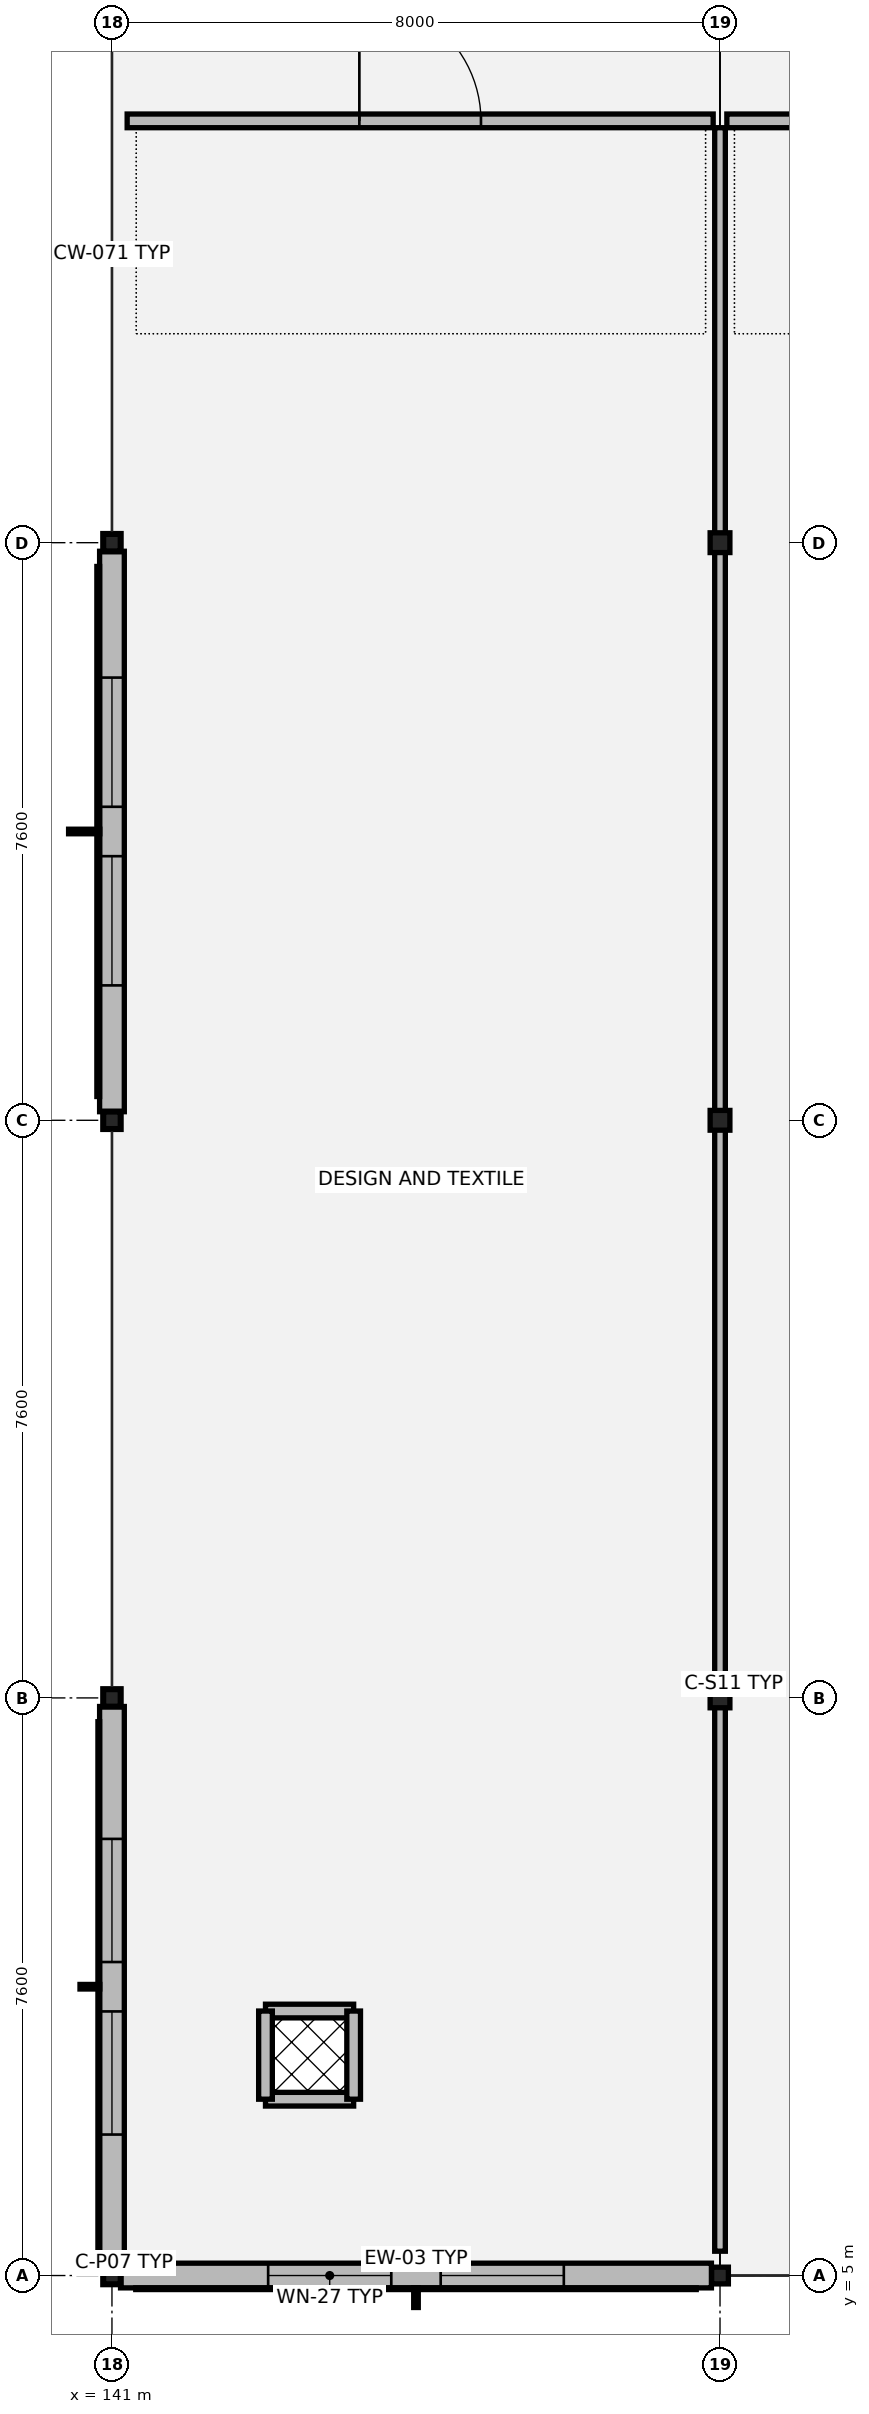
"""IFC4 building model, lengths in metres.
Left out: names, types, materials, properties, quantities, classifications, styles, units other than length and angle.
Written with IfcOpenShell. Run it as: python <this file> out.ifc"""

import sys

from ifc_helpers import new_model, si_unit, direction, frame, frame_2d, origin, origin_2d, place, context, subcontext, project, spatial, rectangle, hollow_rectangle, i_section, extrude, element, fill, save


model = new_model("IFC4")
c1 = context("Model", 3, precision=1e-05, world=origin(), true_north=direction((0.0, 1.0)))
c2 = subcontext(c1, "Body", "Model", "MODEL_VIEW")
j1 = project(units=[si_unit("LENGTHUNIT", "METRE"), si_unit("PLANEANGLEUNIT", "RADIAN")], contexts=[c1])
p1 = place(None, origin())
s1 = spatial("IfcSite", under=j1, at=p1, CompositionType="ELEMENT")
p2 = place(p1, origin())
s2 = spatial("IfcBuilding", under=s1, at=p2, CompositionType="ELEMENT")
p3 = place(p2, frame((0.0, 0.0, 13.26)))
s3 = spatial("IfcBuildingStorey", under=s2, at=p3, CompositionType="ELEMENT", Elevation=13.26)
for number, where, z_axis, x_axis in (
    (1, (141.0, 5.0, 0.0), (0.0, 0.0, 1.0), (1.0, 0.0, 0.0)),
    (2, (141.0, 12.6, 0.0), (0.0, 0.0, 1.0), (1.0, 0.0, 0.0)),
    (3, (141.0, 20.2, 0.0), (0.0, 0.0, 1.0), (1.0, 0.0, 0.0)),
    (4, (141.0, 27.8, 0.0), (0.0, 0.0, 1.0), (1.0, 0.0, 0.0)),
):
    element("IfcColumn", number, at=place(p3, frame(where, z_axis=z_axis, x_axis=x_axis)), inside=s3, PredefinedType="COLUMN", context=c2, shape_type="SweptSolid", body=[
        extrude(hollow_rectangle(XDim=0.22, YDim=0.22, WallThickness=0.01, at=origin_2d()), origin(), (0.0, 0.0, 1.0), 3.855),
    ])
p4 = place(p3, frame((149.0, 5.0, 0.0), z_axis=(0.0, 0.0, 1.0), x_axis=(1.0, 0.0, 0.0)))
e5 = element("IfcColumn", 5, at=p4, inside=s3, PredefinedType="COLUMN", context=c2, shape_type="SweptSolid", body=[
    extrude(hollow_rectangle(XDim=0.22, YDim=0.22, WallThickness=0.01, at=origin_2d()), origin(), (0.0, 0.0, 1.0), 4.055),
])
for number, where, z_axis, x_axis in (
    (6, (149.0, 12.6, 0.0), (0.0, 0.0, 1.0), (1.0, 0.0, 0.0)),
    (7, (149.0, 20.2, 0.0), (0.0, 0.0, 1.0), (1.0, 0.0, 0.0)),
    (8, (149.0, 27.8, 0.0), (0.0, 0.0, 1.0), (1.0, 0.0, 0.0)),
):
    element("IfcColumn", number, at=place(p3, frame(where, z_axis=z_axis, x_axis=x_axis)), inside=s3, PredefinedType="COLUMN", context=c2, shape_type="SweptSolid", body=[
        extrude(i_section(OverallWidth=0.26, OverallDepth=0.26, WebThickness=0.01, FlangeThickness=0.018, at=origin_2d()), origin(), (0.0, 0.0, 1.0), 4.055),
    ])
p5 = place(p3, frame((141.113, 5.0, 0.0), z_axis=(0.0, 0.0, 1.0), x_axis=(1.0, 0.0, 0.0)))
e9 = element("IfcWall", 9, at=p5, inside=s3, PredefinedType="SOLIDWALL", context=c2, shape_type="SweptSolid", body=[
    extrude(rectangle(XDim=7.774, YDim=0.325, at=frame_2d((3.887, 0.0))), origin(), (0.0, 0.0, 1.0), 3.48),
])
p6 = place(p5, frame((1.942, 0.0, 0.8)))
e10 = element("IfcOpeningElement", 10, at=p6, cuts=e9, PredefinedType="OPENING", context=c2, shape_type="SweptSolid", body=[
    extrude(rectangle(XDim=1.62, YDim=2.06, at=frame_2d((0.81, 1.03))), frame((0.0, 0.172, 0.0), z_axis=(0.0, -1.0, 0.0), x_axis=(1.0, 0.0, 0.0)), (0.0, 0.0, 1.0), 0.345),
])
p7 = place(p5, frame((4.212, 0.0, 0.8)))
e11 = element("IfcOpeningElement", 11, at=p7, cuts=e9, PredefinedType="OPENING", context=c2, shape_type="SweptSolid", body=[
    extrude(rectangle(XDim=1.62, YDim=2.06, at=frame_2d((0.81, 1.03))), frame((0.0, 0.172, 0.0), z_axis=(0.0, -1.0, 0.0), x_axis=(1.0, 0.0, 0.0)), (0.0, 0.0, 1.0), 0.345),
])
p8 = place(p3, frame((141.0, 27.687, 0.0), z_axis=(0.0, 0.0, 1.0), x_axis=(0.0, -1.0, 0.0)))
e12 = element("IfcWall", 12, at=p8, inside=s3, PredefinedType="SOLIDWALL", context=c2, shape_type="SweptSolid", body=[
    extrude(rectangle(XDim=7.374, YDim=0.325, at=frame_2d((3.687, 0.0))), origin(), (0.0, 0.0, 1.0), 3.48),
])
p9 = place(p8, frame((1.662, 0.0, 0.8)))
e13 = element("IfcOpeningElement", 13, at=p9, cuts=e12, PredefinedType="OPENING", context=c2, shape_type="SweptSolid", body=[
    extrude(rectangle(XDim=1.7, YDim=2.2, at=frame_2d((0.85, 1.1))), frame((0.0, 0.172, 0.0), z_axis=(0.0, -1.0, 0.0), x_axis=(1.0, 0.0, 0.0)), (0.0, 0.0, 1.0), 0.345),
])
p10 = place(p8, frame((4.012, 0.0, 0.8)))
e14 = element("IfcOpeningElement", 14, at=p10, cuts=e12, PredefinedType="OPENING", context=c2, shape_type="SweptSolid", body=[
    extrude(rectangle(XDim=1.7, YDim=2.2, at=frame_2d((0.85, 1.1))), frame((0.0, 0.172, 0.0), z_axis=(0.0, -1.0, 0.0), x_axis=(1.0, 0.0, 0.0)), (0.0, 0.0, 1.0), 0.345),
])
p11 = place(p3, frame((141.0, 12.487, 0.0), z_axis=(0.0, 0.0, 1.0), x_axis=(0.0, -1.0, 0.0)))
e15 = element("IfcWall", 15, at=p11, inside=s3, PredefinedType="SOLIDWALL", context=c2, shape_type="SweptSolid", body=[
    extrude(rectangle(XDim=7.374, YDim=0.325, at=frame_2d((3.687, 0.0))), origin(), (0.0, 0.0, 1.0), 3.48),
])
p12 = place(p11, frame((1.742, 0.0, 0.8)))
e16 = element("IfcOpeningElement", 16, at=p12, cuts=e15, PredefinedType="OPENING", context=c2, shape_type="SweptSolid", body=[
    extrude(rectangle(XDim=1.62, YDim=2.06, at=frame_2d((0.81, 1.03))), frame((0.0, 0.172, 0.0), z_axis=(0.0, -1.0, 0.0), x_axis=(1.0, 0.0, 0.0)), (0.0, 0.0, 1.0), 0.345),
])
p13 = place(p11, frame((4.012, 0.0, 0.8)))
e17 = element("IfcOpeningElement", 17, at=p13, cuts=e15, PredefinedType="OPENING", context=c2, shape_type="SweptSolid", body=[
    extrude(rectangle(XDim=1.62, YDim=2.06, at=frame_2d((0.81, 1.03))), frame((0.0, 0.172, 0.0), z_axis=(0.0, -1.0, 0.0), x_axis=(1.0, 0.0, 0.0)), (0.0, 0.0, 1.0), 0.345),
])
for number, where, z_axis, x_axis in (
    (18, (143.02, 7.32, 0.0), (0.0, 0.0, 1.0), (1.0, 0.0, 0.0)),
    (19, (144.18, 8.48, 0.0), (0.0, 0.0, 1.0), (-1.0, 0.0, 0.0)),
    (20, (143.02, 8.48, 0.0), (0.0, 0.0, 1.0), (0.0, -1.0, 0.0)),
    (21, (144.18, 7.32, 0.0), (0.0, 0.0, 1.0), (0.0, 1.0, 0.0)),
):
    element("IfcWall", number, at=place(p3, frame(where, z_axis=z_axis, x_axis=x_axis)), inside=s3, PredefinedType="PARTITIONING", context=c2, shape_type="SweptSolid", body=[
        extrude(rectangle(XDim=1.16, YDim=0.18, at=frame_2d((0.58, 0.0))), origin(), (0.0, 0.0, 1.0), 3.18),
    ])
p14 = place(p3, frame((141.2, 33.35, 0.0), z_axis=(0.0, 0.0, 1.0), x_axis=(1.0, 0.0, 0.0)))
e22 = element("IfcWall", 22, at=p14, inside=s3, PredefinedType="PARTITIONING", context=c2, shape_type="SweptSolid", body=[
    extrude(rectangle(XDim=7.71, YDim=0.18, at=frame_2d((3.855, 0.0))), origin(), (0.0, 0.0, 1.0), 3.18),
])
p15 = place(p14, frame((3.055, 0.0, 0.0)))
e23 = element("IfcOpeningElement", 23, at=p15, cuts=e22, PredefinedType="OPENING", context=c2, shape_type="SweptSolid", body=[
    extrude(rectangle(XDim=1.6, YDim=2.25, at=frame_2d((0.8, 1.125))), frame((0.0, 0.1, 0.0), z_axis=(0.0, -1.0, 0.0), x_axis=(1.0, 0.0, 0.0)), (0.0, 0.0, 1.0), 0.2),
])
p16 = place(p3, frame((149.09, 33.35, 0.0), z_axis=(0.0, 0.0, 1.0), x_axis=(1.0, 0.0, 0.0)))
e24 = element("IfcWall", 24, at=p16, inside=s3, PredefinedType="PARTITIONING", context=c2, shape_type="SweptSolid", body=[
    extrude(rectangle(XDim=8.46, YDim=0.18, at=frame_2d((4.23, 0.0))), origin(), (0.0, 0.0, 1.0), 3.18),
])
p17 = place(p16, frame((3.53, 0.0, 0.0)))
e25 = element("IfcOpeningElement", 25, at=p17, cuts=e24, PredefinedType="OPENING", context=c2, shape_type="SweptSolid", body=[
    extrude(rectangle(XDim=1.4, YDim=2.22, at=frame_2d((0.7, 1.11))), frame((0.0, 0.1, 0.0), z_axis=(0.0, -1.0, 0.0), x_axis=(1.0, 0.0, 0.0)), (0.0, 0.0, 1.0), 0.2),
])
p18 = place(p3, frame((149.0, 5.32, 0.0), z_axis=(0.0, 0.0, 1.0), x_axis=(0.0, 1.0, 0.0)))
e26 = element("IfcWall", 26, at=p18, inside=s3, PredefinedType="PARTITIONING", context=c2, shape_type="SweptSolid", body=[
    extrude(rectangle(XDim=27.94, YDim=0.14, at=frame_2d((13.97, 0.0))), origin(), (0.0, 0.0, 1.0), 3.18),
])
p19 = place(p6, origin())
e27 = element("IfcWindow", 27, at=p19, inside=s3, PartitioningType="SINGLE_PANEL", PredefinedType="WINDOW", context=c2, shape_type="SweptSolid", body=[
    extrude(rectangle(XDim=1.62, YDim=2.06, at=frame_2d((0.81, 1.03))), frame((0.0, 0.03, 0.0), z_axis=(0.0, -1.0, 0.0), x_axis=(1.0, 0.0, 0.0)), (0.0, 0.0, 1.0), 0.06),
])
fill(e10, e27)
p20 = place(p7, origin())
e28 = element("IfcWindow", 28, at=p20, inside=s3, PartitioningType="SINGLE_PANEL", PredefinedType="WINDOW", context=c2, shape_type="SweptSolid", body=[
    extrude(rectangle(XDim=1.62, YDim=2.06, at=frame_2d((0.81, 1.03))), frame((0.0, 0.03, 0.0), z_axis=(0.0, -1.0, 0.0), x_axis=(1.0, 0.0, 0.0)), (0.0, 0.0, 1.0), 0.06),
])
fill(e11, e28)
p21 = place(p9, origin())
e29 = element("IfcWindow", 29, at=p21, inside=s3, PartitioningType="SINGLE_PANEL", PredefinedType="WINDOW", context=c2, shape_type="SweptSolid", body=[
    extrude(rectangle(XDim=1.7, YDim=2.2, at=frame_2d((0.85, 1.1))), frame((0.0, 0.03, 0.0), z_axis=(0.0, -1.0, 0.0), x_axis=(1.0, 0.0, 0.0)), (0.0, 0.0, 1.0), 0.06),
])
fill(e13, e29)
p22 = place(p10, origin())
e30 = element("IfcWindow", 30, at=p22, inside=s3, PartitioningType="SINGLE_PANEL", PredefinedType="WINDOW", context=c2, shape_type="SweptSolid", body=[
    extrude(rectangle(XDim=1.7, YDim=2.2, at=frame_2d((0.85, 1.1))), frame((0.0, 0.03, 0.0), z_axis=(0.0, -1.0, 0.0), x_axis=(1.0, 0.0, 0.0)), (0.0, 0.0, 1.0), 0.06),
])
fill(e14, e30)
p23 = place(p12, origin())
e31 = element("IfcWindow", 31, at=p23, inside=s3, PartitioningType="SINGLE_PANEL", PredefinedType="WINDOW", context=c2, shape_type="SweptSolid", body=[
    extrude(rectangle(XDim=1.62, YDim=2.06, at=frame_2d((0.81, 1.03))), frame((0.0, 0.03, 0.0), z_axis=(0.0, -1.0, 0.0), x_axis=(1.0, 0.0, 0.0)), (0.0, 0.0, 1.0), 0.06),
])
fill(e16, e31)
p24 = place(p13, origin())
e32 = element("IfcWindow", 32, at=p24, inside=s3, PartitioningType="SINGLE_PANEL", PredefinedType="WINDOW", context=c2, shape_type="SweptSolid", body=[
    extrude(rectangle(XDim=1.62, YDim=2.06, at=frame_2d((0.81, 1.03))), frame((0.0, 0.03, 0.0), z_axis=(0.0, -1.0, 0.0), x_axis=(1.0, 0.0, 0.0)), (0.0, 0.0, 1.0), 0.06),
])
fill(e17, e32)
p25 = place(p15, origin())
e33 = element("IfcDoor", 33, at=p25, inside=s3, OperationType="DOUBLE_DOOR_SINGLE_SWING", PredefinedType="DOOR", context=c2, shape_type="SweptSolid", body=[
    extrude(rectangle(XDim=1.6, YDim=2.25, at=frame_2d((0.8, 1.125))), frame((0.0, 0.025, 0.0), z_axis=(0.0, -1.0, 0.0), x_axis=(1.0, 0.0, 0.0)), (0.0, 0.0, 1.0), 0.05),
])
fill(e23, e33)
save(model, sys.argv[1])
